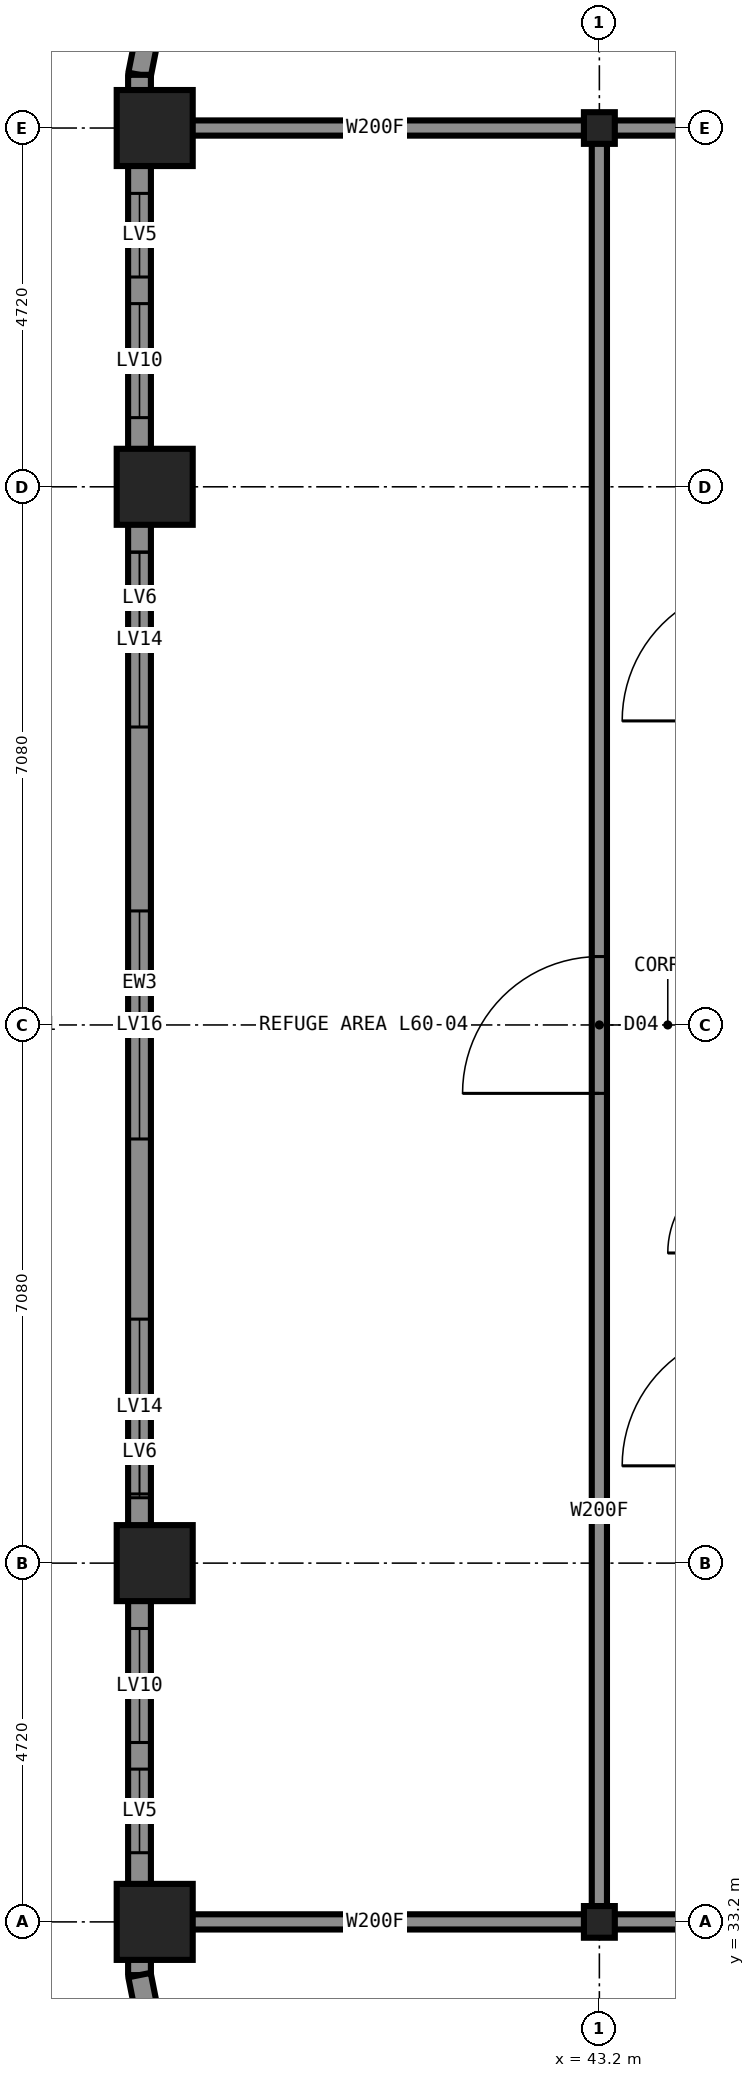
"""IFC4 building model, lengths in metres.
Left out: names, types, materials, properties, quantities, classifications, styles, units other than length and angle.
Written with IfcOpenShell. Run it as: python <this file> out.ifc"""

import sys

from ifc_helpers import new_model, si_unit, direction, frame, frame_2d, origin, origin_2d, place, context, subcontext, project, spatial, rectangle, hollow_rectangle, i_section, extrude, element, fill, save


model = new_model("IFC4")
c1 = context("Model", 3, precision=1e-05, world=origin(), true_north=direction((0.0, 1.0)))
c2 = subcontext(c1, "Body", "Model", "MODEL_VIEW")
j1 = project(units=[si_unit("LENGTHUNIT", "METRE"), si_unit("PLANEANGLEUNIT", "RADIAN")], contexts=[c1])
p1 = place(None, origin())
s1 = spatial("IfcSite", under=j1, at=p1, CompositionType="ELEMENT")
p2 = place(p1, origin())
s2 = spatial("IfcBuilding", under=s1, at=p2, CompositionType="ELEMENT")
p3 = place(p2, frame((0.0, 0.0, 221.3)))
s3 = spatial("IfcBuildingStorey", under=s2, at=p3, CompositionType="ELEMENT", Elevation=221.3)
for number, where, z_axis, x_axis in (
    (1, (37.35, 33.2, 0.0), (0.0, 0.0, 1.0), (1.0, 0.0, 0.0)),
    (2, (37.35, 37.92, 0.0), (0.0, 0.0, 1.0), (1.0, 0.0, 0.0)),
    (3, (37.35, 52.08, 0.0), (0.0, 0.0, 1.0), (1.0, 0.0, 0.0)),
    (4, (37.35, 56.8, 0.0), (0.0, 0.0, 1.0), (1.0, 0.0, 0.0)),
):
    element("IfcColumn", number, at=place(p3, frame(where, z_axis=z_axis, x_axis=x_axis)), inside=s3, PredefinedType="COLUMN", context=c2, shape_type="SweptSolid", body=[
        extrude(hollow_rectangle(XDim=1.0, YDim=1.0, WallThickness=0.06, at=origin_2d()), origin(), (0.0, 0.0, 1.0), 5.4),
    ])
for number, where, z_axis, x_axis in (
    (5, (43.2, 33.2, 0.0), (0.0, 0.0, 1.0), (1.0, 0.0, 0.0)),
    (6, (43.2, 56.8, 0.0), (0.0, 0.0, 1.0), (1.0, 0.0, 0.0)),
):
    element("IfcColumn", number, at=place(p3, frame(where, z_axis=z_axis, x_axis=x_axis)), inside=s3, PredefinedType="COLUMN", context=c2, shape_type="SweptSolid", body=[
        extrude(i_section(OverallWidth=0.406, OverallDepth=0.417, WebThickness=0.03, FlangeThickness=0.048, at=origin_2d()), origin(), (0.0, 0.0, 1.0), 5.4),
    ])
p4 = place(p3, frame((43.2, 33.2, 0.0), z_axis=(0.0, 0.0, 1.0), x_axis=(1.0, 0.0, 0.0)))
e7 = element("IfcWall", 7, at=p4, inside=s3, PredefinedType="PARTITIONING", context=c2, shape_type="SweptSolid", body=[
    extrude(rectangle(XDim=23.6, YDim=0.2, at=frame_2d((11.8, 0.0))), origin(), (0.0, 0.0, 1.0), 5.23),
])
p5 = place(p4, frame((5.3, 0.0, 0.0)))
e8 = element("IfcOpeningElement", 8, at=p5, cuts=e7, PredefinedType="OPENING", context=c2, shape_type="SweptSolid", body=[
    extrude(rectangle(XDim=1.0, YDim=2.1, at=frame_2d((0.5, 1.05))), frame((0.0, 0.11, 0.0), z_axis=(0.0, -1.0, 0.0), x_axis=(1.0, 0.0, 0.0)), (0.0, 0.0, 1.0), 0.22),
])
p6 = place(p3, frame((37.3, 33.2, 0.0), z_axis=(0.0, 0.0, 1.0), x_axis=(1.0, 0.0, 0.0)))
e9 = element("IfcWall", 9, at=p6, inside=s3, PredefinedType="PARTITIONING", context=c2, shape_type="SweptSolid", body=[
    extrude(rectangle(XDim=5.9, YDim=0.2, at=frame_2d((2.95, 0.0))), origin(), (0.0, 0.0, 1.0), 4.473),
])
p7 = place(p3, frame((43.2, 56.8, 0.0), z_axis=(0.0, 0.0, 1.0), x_axis=(1.0, 0.0, 0.0)))
e10 = element("IfcWall", 10, at=p7, inside=s3, PredefinedType="PARTITIONING", context=c2, shape_type="SweptSolid", body=[
    extrude(rectangle(XDim=23.6, YDim=0.2, at=frame_2d((11.8, 0.0))), origin(), (0.0, 0.0, 1.0), 5.23),
])
p8 = place(p7, frame((5.3, 0.0, 0.0)))
e11 = element("IfcOpeningElement", 11, at=p8, cuts=e10, PredefinedType="OPENING", context=c2, shape_type="SweptSolid", body=[
    extrude(rectangle(XDim=1.0, YDim=2.1, at=frame_2d((0.5, 1.05))), frame((0.0, 0.11, 0.0), z_axis=(0.0, -1.0, 0.0), x_axis=(1.0, 0.0, 0.0)), (0.0, 0.0, 1.0), 0.22),
])
p9 = place(p3, frame((37.3, 56.8, 0.0), z_axis=(0.0, 0.0, 1.0), x_axis=(1.0, 0.0, 0.0)))
e12 = element("IfcWall", 12, at=p9, inside=s3, PredefinedType="PARTITIONING", context=c2, shape_type="SweptSolid", body=[
    extrude(rectangle(XDim=5.9, YDim=0.2, at=frame_2d((2.95, 0.0))), origin(), (0.0, 0.0, 1.0), 4.473),
])
p10 = place(p3, frame((43.2, 33.2, 0.0), z_axis=(0.0, 0.0, 1.0), x_axis=(0.0, 1.0, 0.0)))
e13 = element("IfcWall", 13, at=p10, inside=s3, PredefinedType="PARTITIONING", context=c2, shape_type="SweptSolid", body=[
    extrude(rectangle(XDim=23.6, YDim=0.2, at=frame_2d((11.8, 0.0))), origin(), (0.0, 0.0, 1.0), 5.23),
])
p11 = place(p10, frame((10.9, 0.0, 0.0)))
e14 = element("IfcOpeningElement", 14, at=p11, cuts=e13, PredefinedType="OPENING", context=c2, shape_type="SweptSolid", body=[
    extrude(rectangle(XDim=1.8, YDim=2.2, at=frame_2d((0.9, 1.1))), frame((0.0, 0.11, 0.0), z_axis=(0.0, -1.0, 0.0), x_axis=(1.0, 0.0, 0.0)), (0.0, 0.0, 1.0), 0.22),
])
p12 = place(p3, frame((37.557, 59.547, 0.0), z_axis=(0.0, 0.0, 1.0), x_axis=(-0.195081421501, -0.980787050784, 0.0)))
e15 = element("IfcWall", 15, at=p12, inside=s3, PredefinedType="SOLIDWALL", context=c2, shape_type="SweptSolid", body=[
    extrude(rectangle(XDim=2.087, YDim=0.3, at=frame_2d((1.044, 0.0))), origin(), (0.0, 0.0, 1.0), 5.23),
])
p13 = place(p12, frame((0.444, 0.0, 0.6)))
e16 = element("IfcOpeningElement", 16, at=p13, cuts=e15, PredefinedType="OPENING", context=c2, shape_type="SweptSolid", body=[
    extrude(rectangle(XDim=1.2, YDim=1.9, at=frame_2d((0.6, 0.95))), frame((0.0, 0.16, 0.0), z_axis=(0.0, -1.0, 0.0), x_axis=(1.0, 0.0, 0.0)), (0.0, 0.0, 1.0), 0.32),
])
p14 = place(p3, frame((37.15, 57.5, 0.0), z_axis=(0.0, 0.0, 1.0), x_axis=(0.0, -1.0, 0.0)))
e17 = element("IfcWall", 17, at=p14, inside=s3, PredefinedType="SOLIDWALL", context=c2, shape_type="SweptSolid", body=[
    extrude(rectangle(XDim=25.0, YDim=0.3, at=frame_2d((12.5, 0.0))), origin(), (0.0, 0.0, 1.0), 4.43),
])
p15 = place(p14, frame((3.01, 0.0, 2.4)))
e18 = element("IfcOpeningElement", 18, at=p15, cuts=e17, PredefinedType="OPENING", context=c2, shape_type="SweptSolid", body=[
    extrude(rectangle(XDim=1.5, YDim=1.4, at=frame_2d((0.75, 0.7))), frame((0.0, 0.16, 0.0), z_axis=(0.0, -1.0, 0.0), x_axis=(1.0, 0.0, 0.0)), (0.0, 0.0, 1.0), 0.32),
])
p16 = place(p14, frame((6.28, 0.0, 2.0)))
e19 = element("IfcOpeningElement", 19, at=p16, cuts=e17, PredefinedType="OPENING", context=c2, shape_type="SweptSolid", body=[
    extrude(rectangle(XDim=2.3, YDim=1.8, at=frame_2d((1.15, 0.9))), frame((0.0, 0.16, 0.0), z_axis=(0.0, -1.0, 0.0), x_axis=(1.0, 0.0, 0.0)), (0.0, 0.0, 1.0), 0.32),
])
p17 = place(p14, frame((11.0, 0.0, 0.6)))
e20 = element("IfcOpeningElement", 20, at=p17, cuts=e17, PredefinedType="OPENING", context=c2, shape_type="SweptSolid", body=[
    extrude(rectangle(XDim=3.0, YDim=2.0, at=frame_2d((1.5, 1.0))), frame((0.0, 0.16, 0.0), z_axis=(0.0, -1.0, 0.0), x_axis=(1.0, 0.0, 0.0)), (0.0, 0.0, 1.0), 0.32),
])
p18 = place(p14, frame((16.37, 0.0, 2.0)))
e21 = element("IfcOpeningElement", 21, at=p18, cuts=e17, PredefinedType="OPENING", context=c2, shape_type="SweptSolid", body=[
    extrude(rectangle(XDim=2.3, YDim=1.8, at=frame_2d((1.15, 0.9))), frame((0.0, 0.16, 0.0), z_axis=(0.0, -1.0, 0.0), x_axis=(1.0, 0.0, 0.0)), (0.0, 0.0, 1.0), 0.32),
])
p19 = place(p14, frame((20.44, 0.0, 2.4)))
e22 = element("IfcOpeningElement", 22, at=p19, cuts=e17, PredefinedType="OPENING", context=c2, shape_type="SweptSolid", body=[
    extrude(rectangle(XDim=1.5, YDim=1.4, at=frame_2d((0.75, 0.7))), frame((0.0, 0.16, 0.0), z_axis=(0.0, -1.0, 0.0), x_axis=(1.0, 0.0, 0.0)), (0.0, 0.0, 1.0), 0.32),
])
p20 = place(p14, frame((1.56, 0.0, 0.6)))
e23 = element("IfcOpeningElement", 23, at=p20, cuts=e17, PredefinedType="OPENING", context=c2, shape_type="SweptSolid", body=[
    extrude(rectangle(XDim=1.1, YDim=1.0, at=frame_2d((0.55, 0.5))), frame((0.0, 0.16, 0.0), z_axis=(0.0, -1.0, 0.0), x_axis=(1.0, 0.0, 0.0)), (0.0, 0.0, 1.0), 0.32),
])
p21 = place(p14, frame((6.28, 0.0, 1.2)))
e24 = element("IfcOpeningElement", 24, at=p21, cuts=e17, PredefinedType="OPENING", context=c2, shape_type="SweptSolid", body=[
    extrude(rectangle(XDim=1.2, YDim=0.8, at=frame_2d((0.6, 0.4))), frame((0.0, 0.16, 0.0), z_axis=(0.0, -1.0, 0.0), x_axis=(1.0, 0.0, 0.0)), (0.0, 0.0, 1.0), 0.32),
])
p22 = place(p14, frame((17.52, 0.0, 1.2)))
e25 = element("IfcOpeningElement", 25, at=p22, cuts=e17, PredefinedType="OPENING", context=c2, shape_type="SweptSolid", body=[
    extrude(rectangle(XDim=1.2, YDim=0.8, at=frame_2d((0.6, 0.4))), frame((0.0, 0.16, 0.0), z_axis=(0.0, -1.0, 0.0), x_axis=(1.0, 0.0, 0.0)), (0.0, 0.0, 1.0), 0.32),
])
p23 = place(p14, frame((22.29, 0.0, 0.6)))
e26 = element("IfcOpeningElement", 26, at=p23, cuts=e17, PredefinedType="OPENING", context=c2, shape_type="SweptSolid", body=[
    extrude(rectangle(XDim=1.1, YDim=1.0, at=frame_2d((0.55, 0.5))), frame((0.0, 0.16, 0.0), z_axis=(0.0, -1.0, 0.0), x_axis=(1.0, 0.0, 0.0)), (0.0, 0.0, 1.0), 0.32),
])
p24 = place(p3, frame((37.15, 32.5, 0.0), z_axis=(0.0, 0.0, 1.0), x_axis=(0.195081421501, -0.980787050784, 0.0)))
e27 = element("IfcWall", 27, at=p24, inside=s3, PredefinedType="SOLIDWALL", context=c2, shape_type="SweptSolid", body=[
    extrude(rectangle(XDim=2.087, YDim=0.3, at=frame_2d((1.044, 0.0))), origin(), (0.0, 0.0, 1.0), 5.23),
])
p25 = place(p24, frame((0.444, 0.0, 0.6)))
e28 = element("IfcOpeningElement", 28, at=p25, cuts=e27, PredefinedType="OPENING", context=c2, shape_type="SweptSolid", body=[
    extrude(rectangle(XDim=1.2, YDim=1.9, at=frame_2d((0.6, 0.95))), frame((0.0, 0.16, 0.0), z_axis=(0.0, -1.0, 0.0), x_axis=(1.0, 0.0, 0.0)), (0.0, 0.0, 1.0), 0.32),
])
p26 = place(p11, origin())
e29 = element("IfcDoor", 29, at=p26, inside=s3, OperationType="DOUBLE_DOOR_SINGLE_SWING", PredefinedType="DOOR", context=c2, shape_type="SweptSolid", body=[
    extrude(rectangle(XDim=1.8, YDim=2.2, at=frame_2d((0.9, 1.1))), frame((0.0, 0.025, 0.0), z_axis=(0.0, -1.0, 0.0), x_axis=(1.0, 0.0, 0.0)), (0.0, 0.0, 1.0), 0.05),
])
fill(e14, e29)
p27 = place(p15, origin())
e30 = element("IfcWindow", 30, at=p27, inside=s3, PartitioningType="SINGLE_PANEL", PredefinedType="USERDEFINED", context=c2, shape_type="SweptSolid", body=[
    extrude(rectangle(XDim=1.5, YDim=1.4, at=frame_2d((0.75, 0.7))), frame((0.0, 0.03, 0.0), z_axis=(0.0, -1.0, 0.0), x_axis=(1.0, 0.0, 0.0)), (0.0, 0.0, 1.0), 0.06),
])
fill(e18, e30)
p28 = place(p16, origin())
e31 = element("IfcWindow", 31, at=p28, inside=s3, PartitioningType="SINGLE_PANEL", PredefinedType="USERDEFINED", context=c2, shape_type="SweptSolid", body=[
    extrude(rectangle(XDim=2.3, YDim=1.8, at=frame_2d((1.15, 0.9))), frame((0.0, 0.03, 0.0), z_axis=(0.0, -1.0, 0.0), x_axis=(1.0, 0.0, 0.0)), (0.0, 0.0, 1.0), 0.06),
])
fill(e19, e31)
p29 = place(p17, origin())
e32 = element("IfcWindow", 32, at=p29, inside=s3, PartitioningType="SINGLE_PANEL", PredefinedType="USERDEFINED", context=c2, shape_type="SweptSolid", body=[
    extrude(rectangle(XDim=3.0, YDim=2.0, at=frame_2d((1.5, 1.0))), frame((0.0, 0.03, 0.0), z_axis=(0.0, -1.0, 0.0), x_axis=(1.0, 0.0, 0.0)), (0.0, 0.0, 1.0), 0.06),
])
fill(e20, e32)
p30 = place(p18, origin())
e33 = element("IfcWindow", 33, at=p30, inside=s3, PartitioningType="SINGLE_PANEL", PredefinedType="USERDEFINED", context=c2, shape_type="SweptSolid", body=[
    extrude(rectangle(XDim=2.3, YDim=1.8, at=frame_2d((1.15, 0.9))), frame((0.0, 0.03, 0.0), z_axis=(0.0, -1.0, 0.0), x_axis=(1.0, 0.0, 0.0)), (0.0, 0.0, 1.0), 0.06),
])
fill(e21, e33)
p31 = place(p19, origin())
e34 = element("IfcWindow", 34, at=p31, inside=s3, PartitioningType="SINGLE_PANEL", PredefinedType="USERDEFINED", context=c2, shape_type="SweptSolid", body=[
    extrude(rectangle(XDim=1.5, YDim=1.4, at=frame_2d((0.75, 0.7))), frame((0.0, 0.03, 0.0), z_axis=(0.0, -1.0, 0.0), x_axis=(1.0, 0.0, 0.0)), (0.0, 0.0, 1.0), 0.06),
])
fill(e22, e34)
p32 = place(p20, origin())
e35 = element("IfcWindow", 35, at=p32, inside=s3, PartitioningType="SINGLE_PANEL", PredefinedType="USERDEFINED", context=c2, shape_type="SweptSolid", body=[
    extrude(rectangle(XDim=1.1, YDim=1.0, at=frame_2d((0.55, 0.5))), frame((0.0, 0.03, 0.0), z_axis=(0.0, -1.0, 0.0), x_axis=(1.0, 0.0, 0.0)), (0.0, 0.0, 1.0), 0.06),
])
fill(e23, e35)
p33 = place(p21, origin())
e36 = element("IfcWindow", 36, at=p33, inside=s3, PartitioningType="SINGLE_PANEL", PredefinedType="USERDEFINED", context=c2, shape_type="SweptSolid", body=[
    extrude(rectangle(XDim=1.2, YDim=0.8, at=frame_2d((0.6, 0.4))), frame((0.0, 0.03, 0.0), z_axis=(0.0, -1.0, 0.0), x_axis=(1.0, 0.0, 0.0)), (0.0, 0.0, 1.0), 0.06),
])
fill(e24, e36)
p34 = place(p22, origin())
e37 = element("IfcWindow", 37, at=p34, inside=s3, PartitioningType="SINGLE_PANEL", PredefinedType="USERDEFINED", context=c2, shape_type="SweptSolid", body=[
    extrude(rectangle(XDim=1.2, YDim=0.8, at=frame_2d((0.6, 0.4))), frame((0.0, 0.03, 0.0), z_axis=(0.0, -1.0, 0.0), x_axis=(1.0, 0.0, 0.0)), (0.0, 0.0, 1.0), 0.06),
])
fill(e25, e37)
p35 = place(p23, origin())
e38 = element("IfcWindow", 38, at=p35, inside=s3, PartitioningType="SINGLE_PANEL", PredefinedType="USERDEFINED", context=c2, shape_type="SweptSolid", body=[
    extrude(rectangle(XDim=1.1, YDim=1.0, at=frame_2d((0.55, 0.5))), frame((0.0, 0.03, 0.0), z_axis=(0.0, -1.0, 0.0), x_axis=(1.0, 0.0, 0.0)), (0.0, 0.0, 1.0), 0.06),
])
fill(e26, e38)
save(model, sys.argv[1])
